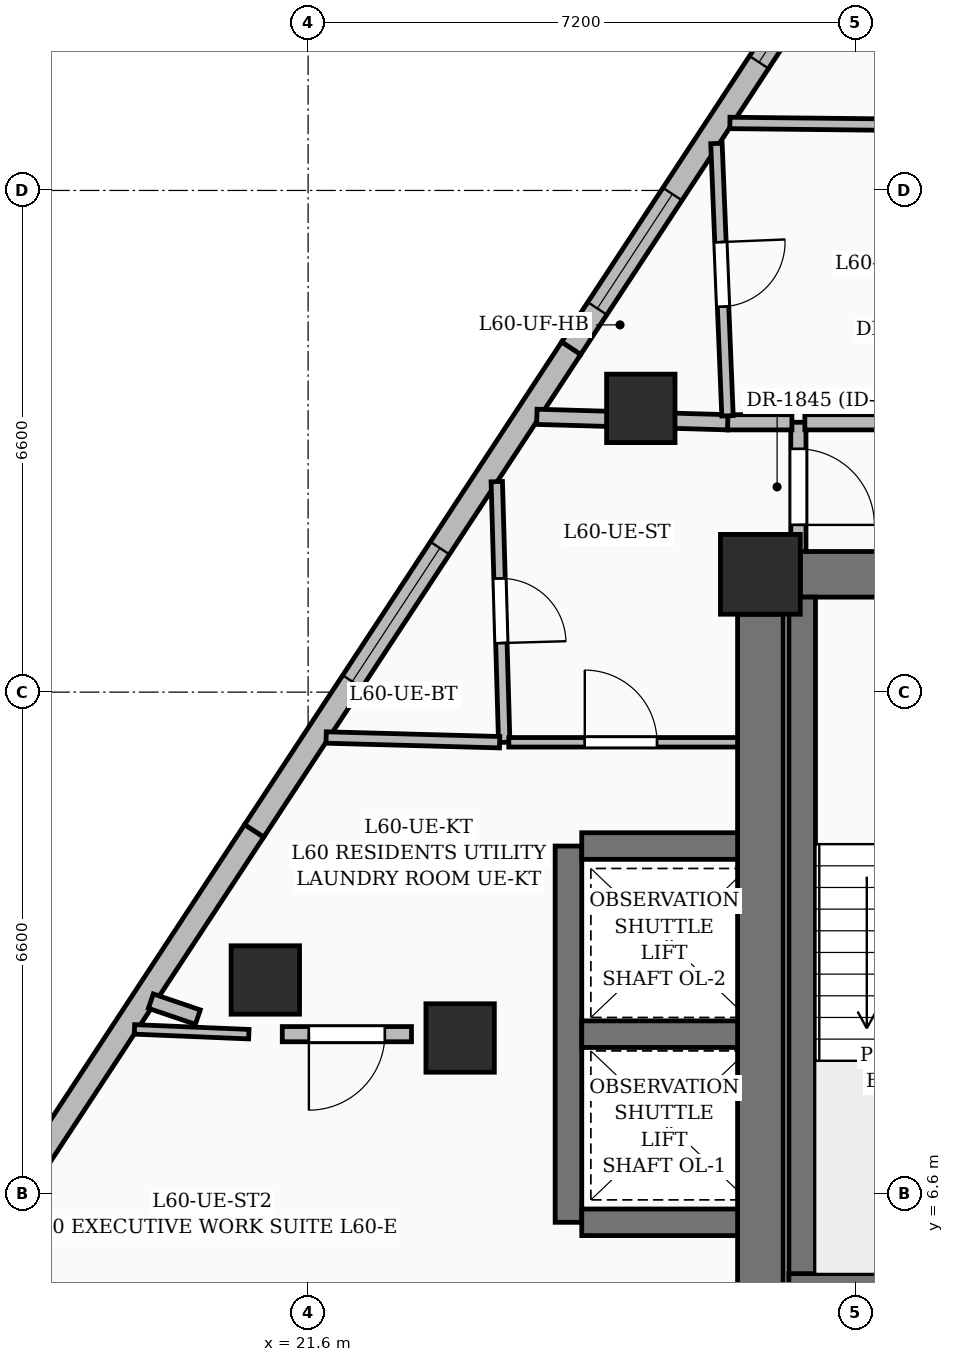
"""IFC4 building model, lengths in metres.
Left out: names, types, materials, properties, quantities, classifications, styles, units other than length and angle.
Written with IfcOpenShell. Run it as: python <this file> out.ifc"""

import sys

from ifc_helpers import new_model, si_unit, direction, frame, frame_2d, origin, origin_2d, place, context, subcontext, project, spatial, rectangle, extrude, element, fill, save


model = new_model("IFC4")
c1 = context("Model", 3, precision=1e-05, world=origin(), true_north=direction((0.0, 1.0)))
c2 = subcontext(c1, "Body", "Model", "MODEL_VIEW")
j1 = project(units=[si_unit("LENGTHUNIT", "METRE"), si_unit("PLANEANGLEUNIT", "RADIAN")], contexts=[c1])
p1 = place(None, origin())
s1 = spatial("IfcSite", under=j1, at=p1, CompositionType="ELEMENT")
p2 = place(p1, origin())
s2 = spatial("IfcBuilding", under=s1, at=p2, CompositionType="ELEMENT")
p3 = place(p2, frame((0.0, 0.0, 233.25)))
s3 = spatial("IfcBuildingStorey", under=s2, at=p3, CompositionType="ELEMENT", Elevation=233.25)
p4 = place(p3, frame((27.55, 14.75, 0.0), z_axis=(0.0, 0.0, 1.0), x_axis=(1.0, 0.0, 0.0)))
e1 = element("IfcColumn", 1, at=p4, inside=s3, PredefinedType="COLUMN", context=c2, shape_type="SweptSolid", body=[
    extrude(rectangle(XDim=1.05, YDim=1.05, at=origin_2d()), origin(), (0.0, 0.0, 1.0), 3.75),
])
p5 = place(p3, frame((23.6, 8.65, 0.0), z_axis=(0.0, 0.0, 1.0), x_axis=(1.0, 0.0, 0.0)))
e2 = element("IfcColumn", 2, at=p5, inside=s3, PredefinedType="COLUMN", context=c2, shape_type="SweptSolid", body=[
    extrude(rectangle(XDim=0.9, YDim=0.9, at=origin_2d()), origin(), (0.0, 0.0, 1.0), 3.75),
])
p6 = place(p3, frame((28.075, 14.75, 0.0), z_axis=(0.0, 0.0, 1.0), x_axis=(1.0, 0.0, 0.0)))
e3 = element("IfcWall", 3, at=p6, inside=s3, PredefinedType="SHEAR", context=c2, shape_type="SweptSolid", body=[
    extrude(rectangle(XDim=6.55, YDim=0.6, at=frame_2d((3.275, 0.0))), origin(), (0.0, 0.0, 1.0), 3.75),
])
p7 = place(p6, frame((1.1, 0.0, 0.0)))
e4 = element("IfcOpeningElement", 4, at=p7, cuts=e3, PredefinedType="OPENING", context=c2, shape_type="SweptSolid", body=[
    extrude(rectangle(XDim=1.05, YDim=2.15, at=frame_2d((0.525, 1.075))), frame((0.0, 0.31, 0.0), z_axis=(0.0, -1.0, 0.0), x_axis=(1.0, 0.0, 0.0)), (0.0, 0.0, 1.0), 0.62),
])
p8 = place(p6, frame((4.95, 0.0, 0.0)))
e5 = element("IfcOpeningElement", 5, at=p8, cuts=e3, PredefinedType="OPENING", context=c2, shape_type="SweptSolid", body=[
    extrude(rectangle(XDim=0.95, YDim=2.15, at=frame_2d((0.475, 1.075))), frame((0.0, 0.31, 0.0), z_axis=(0.0, -1.0, 0.0), x_axis=(1.0, 0.0, 0.0)), (0.0, 0.0, 1.0), 0.62),
])
p9 = place(p3, frame((27.55, 5.075, 0.0), z_axis=(0.0, 0.0, 1.0), x_axis=(0.0, 1.0, 0.0)))
e6 = element("IfcWall", 6, at=p9, inside=s3, PredefinedType="SHEAR", context=c2, shape_type="SweptSolid", body=[
    extrude(rectangle(XDim=9.15, YDim=0.6, at=frame_2d((4.575, 0.0))), origin(), (0.0, 0.0, 1.0), 3.75),
])
p10 = place(p3, frame((28.1, 5.2, 0.0), z_axis=(0.0, 0.0, 1.0), x_axis=(0.0, 1.0, 0.0)))
e7 = element("IfcWall", 7, at=p10, inside=s3, PredefinedType="SOLIDWALL", context=c2, shape_type="SweptSolid", body=[
    extrude(rectangle(XDim=9.25, YDim=0.35, at=frame_2d((4.625, 0.0))), origin(), (0.0, 0.0, 1.0), 3.75),
])
p11 = place(p3, frame((27.925, 5.375, 0.0), z_axis=(0.0, 0.0, 1.0), x_axis=(1.0, 0.0, 0.0)))
e8 = element("IfcWall", 8, at=p11, inside=s3, PredefinedType="SOLIDWALL", context=c2, shape_type="SweptSolid", body=[
    extrude(rectangle(XDim=3.55, YDim=0.35, at=frame_2d((1.775, 0.0))), origin(), (0.0, 0.0, 1.0), 3.75),
])
p12 = place(p3, frame((25.025, 6.225, 0.0), z_axis=(0.0, 0.0, 1.0), x_axis=(0.0, 1.0, 0.0)))
e9 = element("IfcWall", 9, at=p12, inside=s3, PredefinedType="SOLIDWALL", context=c2, shape_type="SweptSolid", body=[
    extrude(rectangle(XDim=4.95, YDim=0.35, at=frame_2d((2.475, 0.0))), origin(), (0.0, 0.0, 1.0), 3.75),
])
for number, where, z_axis, x_axis in (
    (10, (25.2, 6.225, 0.0), (0.0, 0.0, 1.0), (1.0, 0.0, 0.0)),
    (11, (25.2, 8.7, 0.0), (0.0, 0.0, 1.0), (1.0, 0.0, 0.0)),
    (12, (25.2, 11.175, 0.0), (0.0, 0.0, 1.0), (1.0, 0.0, 0.0)),
):
    element("IfcWall", number, at=place(p3, frame(where, z_axis=z_axis, x_axis=x_axis)), inside=s3, PredefinedType="SOLIDWALL", context=c2, shape_type="SweptSolid", body=[
        extrude(rectangle(XDim=2.05, YDim=0.35, at=frame_2d((1.025, 0.0))), origin(), (0.0, 0.0, 1.0), 3.75),
    ])
for number, where, z_axis, x_axis in (
    (13, (25.977, 16.933, 0.0), (0.0, 0.0, 1.0), (1.0, 0.0, 0.0)),
    (14, (21.037, 9.413, 0.0), (0.0, 0.0, 1.0), (1.0, 0.0, 0.0)),
):
    element("IfcColumn", number, at=place(p3, frame(where, z_axis=z_axis, x_axis=x_axis)), inside=s3, PredefinedType="COLUMN", context=c2, shape_type="SweptSolid", body=[
        extrude(rectangle(XDim=0.9, YDim=0.9, at=origin_2d()), origin(), (0.0, 0.0, 1.0), 3.75),
    ])
p13 = place(p3, frame((19.054, 4.36, 0.0), z_axis=(0.0, 0.0, 1.0), x_axis=(-0.726119894398, 0.68756810496, 0.0)))
e15 = element("IfcWall", 15, at=p13, inside=s3, PredefinedType="SOLIDWALL", context=c2, shape_type="SweptSolid", body=[
    extrude(rectangle(XDim=1.995, YDim=0.3, at=frame_2d((0.998, 0.0))), origin(), (0.0, 0.0, 1.0), 3.5),
])
p14 = place(p3, frame((17.057, 5.54, 0.0), z_axis=(0.0, 0.0, 1.0), x_axis=(0.549039031033, 0.83579671117, 0.0)))
e16 = element("IfcWall", 16, at=p14, inside=s3, PredefinedType="SOLIDWALL", context=c2, shape_type="SweptSolid", body=[
    extrude(rectangle(XDim=6.982, YDim=0.3, at=frame_2d((3.491, 0.0))), origin(), (0.0, 0.0, 1.0), 3.5),
])
p15 = place(p3, frame((20.89, 11.376, 0.0), z_axis=(0.0, 0.0, 1.0), x_axis=(0.549043857383, 0.835793540697, 0.0)))
e17 = element("IfcWall", 17, at=p15, inside=s3, PredefinedType="SOLIDWALL", context=c2, shape_type="SweptSolid", body=[
    extrude(rectangle(XDim=7.597, YDim=0.3, at=frame_2d((3.799, 0.0))), origin(), (0.0, 0.0, 1.0), 3.5),
])
p16 = place(p15, frame((2.35, 0.0, 0.55)))
e18 = element("IfcOpeningElement", 18, at=p16, cuts=e17, PredefinedType="OPENING", context=c2, shape_type="SweptSolid", body=[
    extrude(rectangle(XDim=2.1, YDim=2.4, at=frame_2d((1.05, 1.2))), frame((0.0, 0.16, 0.0), z_axis=(0.0, -1.0, 0.0), x_axis=(1.0, 0.0, 0.0)), (0.0, 0.0, 1.0), 0.32),
])
p17 = place(p3, frame((25.062, 17.725, 0.0), z_axis=(0.0, 0.0, 1.0), x_axis=(0.549051383212, 0.835788596831, 0.0)))
e19 = element("IfcWall", 19, at=p17, inside=s3, PredefinedType="SOLIDWALL", context=c2, shape_type="SweptSolid", body=[
    extrude(rectangle(XDim=7.317, YDim=0.3, at=frame_2d((3.659, 0.0))), origin(), (0.0, 0.0, 1.0), 3.5),
])
p18 = place(p17, frame((0.625, 0.0, 0.6)))
e20 = element("IfcOpeningElement", 20, at=p18, cuts=e19, PredefinedType="OPENING", context=c2, shape_type="SweptSolid", body=[
    extrude(rectangle(XDim=1.8, YDim=2.1, at=frame_2d((0.9, 1.05))), frame((0.0, 0.16, 0.0), z_axis=(0.0, -1.0, 0.0), x_axis=(1.0, 0.0, 0.0)), (0.0, 0.0, 1.0), 0.32),
])
p19 = place(p17, frame((4.5, 0.0, 0.6)))
e21 = element("IfcOpeningElement", 21, at=p19, cuts=e19, PredefinedType="OPENING", context=c2, shape_type="SweptSolid", body=[
    extrude(rectangle(XDim=1.8, YDim=2.1, at=frame_2d((0.9, 1.05))), frame((0.0, 0.16, 0.0), z_axis=(0.0, -1.0, 0.0), x_axis=(1.0, 0.0, 0.0)), (0.0, 0.0, 1.0), 0.32),
])
p20 = place(p3, frame((28.05, 16.75, 0.0), z_axis=(0.0, 0.0, 1.0), x_axis=(0.0, -1.0, 0.0)))
e22 = element("IfcWall", 22, at=p20, inside=s3, PredefinedType="PARTITIONING", context=c2, shape_type="SweptSolid", body=[
    extrude(rectangle(XDim=1.7, YDim=0.2, at=frame_2d((0.85, 0.0))), origin(), (0.0, 0.0, 1.0), 3.5),
])
p21 = place(p20, frame((0.35, 0.0, 0.0)))
e23 = element("IfcOpeningElement", 23, at=p21, cuts=e22, PredefinedType="OPENING", context=c2, shape_type="SweptSolid", body=[
    extrude(rectangle(XDim=1.0, YDim=2.2, at=frame_2d((0.5, 1.1))), frame((0.0, 0.11, 0.0), z_axis=(0.0, -1.0, 0.0), x_axis=(1.0, 0.0, 0.0)), (0.0, 0.0, 1.0), 0.22),
])
p22 = place(p3, frame((33.66, 16.75, 0.0), z_axis=(0.0, 0.0, 1.0), x_axis=(-1.0, 0.0, 0.0)))
e24 = element("IfcWall", 24, at=p22, inside=s3, PredefinedType="PARTITIONING", context=c2, shape_type="SweptSolid", body=[
    extrude(rectangle(XDim=5.525, YDim=0.2, at=frame_2d((2.762, 0.0))), origin(), (0.0, 0.0, 1.0), 3.5),
])
p23 = place(p22, frame((2.364, 0.0, 0.0)))
e25 = element("IfcOpeningElement", 25, at=p23, cuts=e24, PredefinedType="OPENING", context=c2, shape_type="SweptSolid", body=[
    extrude(rectangle(XDim=1.0, YDim=2.2, at=frame_2d((0.5, 1.1))), frame((0.0, 0.11, 0.0), z_axis=(0.0, -1.0, 0.0), x_axis=(1.0, 0.0, 0.0)), (0.0, 0.0, 1.0), 0.22),
])
p24 = place(p3, frame((20.149, 8.925, 0.0), z_axis=(0.0, 0.0, 1.0), x_axis=(-0.946606200233, 0.322392155117, 0.0)))
e26 = element("IfcWall", 26, at=p24, inside=s3, PredefinedType="PARTITIONING", context=c2, shape_type="SweptSolid", body=[
    extrude(rectangle(XDim=0.653, YDim=0.2, at=frame_2d((0.326, 0.0))), origin(), (0.0, 0.0, 1.0), 3.5),
])
p25 = place(p3, frame((22.96, 8.7, 0.0), z_axis=(0.0, 0.0, 1.0), x_axis=(-1.0, 0.0, 0.0)))
e27 = element("IfcWall", 27, at=p25, inside=s3, PredefinedType="PARTITIONING", context=c2, shape_type="SweptSolid", body=[
    extrude(rectangle(XDim=1.7, YDim=0.2, at=frame_2d((0.85, 0.0))), origin(), (0.0, 0.0, 1.0), 2.685),
])
p26 = place(p25, frame((0.35, 0.0, 0.0)))
e28 = element("IfcOpeningElement", 28, at=p26, cuts=e27, PredefinedType="OPENING", context=c2, shape_type="SweptSolid", body=[
    extrude(rectangle(XDim=1.0, YDim=2.2, at=frame_2d((0.5, 1.1))), frame((0.0, 0.11, 0.0), z_axis=(0.0, -1.0, 0.0), x_axis=(1.0, 0.0, 0.0)), (0.0, 0.0, 1.0), 0.22),
])
p27 = place(p3, frame((24.082, 15.969, 0.0), z_axis=(0.0, 0.0, 1.0), x_axis=(0.02853945599, -0.999592666766, 0.0)))
e29 = element("IfcWall", 29, at=p27, inside=s3, PredefinedType="PARTITIONING", context=c2, shape_type="SweptSolid", body=[
    extrude(rectangle(XDim=3.43, YDim=0.15, at=frame_2d((1.715, 0.0))), origin(), (0.0, 0.0, 1.0), 2.82),
])
p28 = place(p27, frame((1.274, 0.0, 0.0)))
e30 = element("IfcOpeningElement", 30, at=p28, cuts=e29, PredefinedType="OPENING", context=c2, shape_type="SweptSolid", body=[
    extrude(rectangle(XDim=0.85, YDim=2.1, at=frame_2d((0.425, 1.05))), frame((0.0, 0.085, 0.0), z_axis=(0.0, -1.0, 0.0), x_axis=(1.0, 0.0, 0.0)), (0.0, 0.0, 1.0), 0.17),
])
p29 = place(p3, frame((24.24, 12.54, 0.0), z_axis=(0.0, 0.0, 1.0), x_axis=(1.0, 0.0, 0.0)))
e31 = element("IfcWall", 31, at=p29, inside=s3, PredefinedType="PARTITIONING", context=c2, shape_type="SweptSolid", body=[
    extrude(rectangle(XDim=3.01, YDim=0.125, at=frame_2d((1.505, 0.0))), origin(), (0.0, 0.0, 1.0), 3.5),
])
p30 = place(p29, frame((1.0, 0.0, 0.0)))
e32 = element("IfcOpeningElement", 32, at=p30, cuts=e31, PredefinedType="OPENING", context=c2, shape_type="SweptSolid", body=[
    extrude(rectangle(XDim=0.95, YDim=2.2, at=frame_2d((0.475, 1.1))), frame((0.0, 0.072, 0.0), z_axis=(0.0, -1.0, 0.0), x_axis=(1.0, 0.0, 0.0)), (0.0, 0.0, 1.0), 0.145),
])
p31 = place(p3, frame((27.965, 16.75, 0.0), z_axis=(0.0, 0.0, 1.0), x_axis=(-1.0, 0.0, 0.0)))
e33 = element("IfcWall", 33, at=p31, inside=s3, PredefinedType="PARTITIONING", context=c2, shape_type="SweptSolid", body=[
    extrude(rectangle(XDim=0.845, YDim=0.2, at=frame_2d((0.422, 0.0))), origin(), (0.0, 0.0, 1.0), 3.061),
])
p32 = place(p3, frame((27.12, 16.75, 0.0), z_axis=(0.0, 0.0, 1.0), x_axis=(-0.999588989249, 0.028667971206, 0.0)))
e34 = element("IfcWall", 34, at=p32, inside=s3, PredefinedType="PARTITIONING", context=c2, shape_type="SweptSolid", body=[
    extrude(rectangle(XDim=2.512, YDim=0.2, at=frame_2d((1.256, 0.0))), origin(), (0.0, 0.0, 1.0), 3.5),
])
p33 = place(p3, frame((21.837, 12.603, 0.0), z_axis=(0.0, 0.0, 1.0), x_axis=(0.999634267339, -0.027043142604, 0.0)))
e35 = element("IfcWall", 35, at=p33, inside=s3, PredefinedType="PARTITIONING", context=c2, shape_type="SweptSolid", body=[
    extrude(rectangle(XDim=2.284, YDim=0.15, at=frame_2d((1.142, 0.0))), origin(), (0.0, 0.0, 1.0), 2.82),
])
p34 = place(p3, frame((26.972, 20.418, 0.0), z_axis=(0.0, 0.0, 1.0), x_axis=(0.040645044175, -0.999173648764, 0.0)))
e36 = element("IfcWall", 36, at=p34, inside=s3, PredefinedType="PARTITIONING", context=c2, shape_type="SweptSolid", body=[
    extrude(rectangle(XDim=3.586, YDim=0.15, at=frame_2d((1.793, 0.0))), origin(), (0.0, 0.0, 1.0), 2.82),
])
p35 = place(p34, frame((1.298, 0.0, 0.0)))
e37 = element("IfcOpeningElement", 37, at=p35, cuts=e36, PredefinedType="OPENING", context=c2, shape_type="SweptSolid", body=[
    extrude(rectangle(XDim=0.85, YDim=2.1, at=frame_2d((0.425, 1.05))), frame((0.0, 0.085, 0.0), z_axis=(0.0, -1.0, 0.0), x_axis=(1.0, 0.0, 0.0)), (0.0, 0.0, 1.0), 0.17),
])
p36 = place(p3, frame((33.613, 20.62, 0.0), z_axis=(0.0, 0.0, 1.0), x_axis=(-0.999945270441, 0.010462128042, 0.0)))
e38 = element("IfcWall", 38, at=p36, inside=s3, PredefinedType="PARTITIONING", context=c2, shape_type="SweptSolid", body=[
    extrude(rectangle(XDim=6.464, YDim=0.15, at=frame_2d((3.232, 0.0))), origin(), (0.0, 0.0, 1.0), 2.685),
])
p37 = place(p36, frame((2.835, 0.0, 0.0)))
e39 = element("IfcOpeningElement", 39, at=p37, cuts=e38, PredefinedType="OPENING", context=c2, shape_type="SweptSolid", body=[
    extrude(rectangle(XDim=0.9, YDim=2.15, at=frame_2d((0.45, 1.075))), frame((0.0, 0.085, 0.0), z_axis=(0.0, -1.0, 0.0), x_axis=(1.0, 0.0, 0.0)), (0.0, 0.0, 1.0), 0.17),
])
p38 = place(p3, frame((20.82, 8.7, 0.0), z_axis=(0.0, 0.0, 1.0), x_axis=(-0.999125472924, 0.041812550205, 0.0)))
e40 = element("IfcWall", 40, at=p38, inside=s3, PredefinedType="PARTITIONING", context=c2, shape_type="SweptSolid", body=[
    extrude(rectangle(XDim=1.506, YDim=0.125, at=frame_2d((0.753, 0.0))), origin(), (0.0, 0.0, 1.0), 3.5),
])
p39 = place(p16, origin())
e41 = element("IfcWindow", 41, at=p39, inside=s3, PartitioningType="SINGLE_PANEL", PredefinedType="WINDOW", context=c2, shape_type="SweptSolid", body=[
    extrude(rectangle(XDim=2.1, YDim=2.4, at=frame_2d((1.05, 1.2))), frame((0.0, 0.03, 0.0), z_axis=(0.0, -1.0, 0.0), x_axis=(1.0, 0.0, 0.0)), (0.0, 0.0, 1.0), 0.06),
])
fill(e18, e41)
p40 = place(p18, origin())
e42 = element("IfcWindow", 42, at=p40, inside=s3, PartitioningType="SINGLE_PANEL", PredefinedType="WINDOW", context=c2, shape_type="SweptSolid", body=[
    extrude(rectangle(XDim=1.8, YDim=2.1, at=frame_2d((0.9, 1.05))), frame((0.0, 0.03, 0.0), z_axis=(0.0, -1.0, 0.0), x_axis=(1.0, 0.0, 0.0)), (0.0, 0.0, 1.0), 0.06),
])
fill(e20, e42)
p41 = place(p19, origin())
e43 = element("IfcWindow", 43, at=p41, inside=s3, PartitioningType="SINGLE_PANEL", PredefinedType="WINDOW", context=c2, shape_type="SweptSolid", body=[
    extrude(rectangle(XDim=1.8, YDim=2.1, at=frame_2d((0.9, 1.05))), frame((0.0, 0.03, 0.0), z_axis=(0.0, -1.0, 0.0), x_axis=(1.0, 0.0, 0.0)), (0.0, 0.0, 1.0), 0.06),
])
fill(e21, e43)
p42 = place(p21, origin())
e44 = element("IfcDoor", 44, at=p42, inside=s3, OperationType="SINGLE_SWING_RIGHT", PredefinedType="DOOR", context=c2, shape_type="SweptSolid", body=[
    extrude(rectangle(XDim=1.0, YDim=2.2, at=frame_2d((0.5, 1.1))), frame((0.0, 0.025, 0.0), z_axis=(0.0, -1.0, 0.0), x_axis=(1.0, 0.0, 0.0)), (0.0, 0.0, 1.0), 0.05),
])
fill(e23, e44)
p43 = place(p30, origin())
e45 = element("IfcDoor", 45, at=p43, inside=s3, OperationType="SINGLE_SWING_LEFT", PredefinedType="DOOR", context=c2, shape_type="SweptSolid", body=[
    extrude(rectangle(XDim=0.95, YDim=2.2, at=frame_2d((0.475, 1.1))), frame((0.0, 0.025, 0.0), z_axis=(0.0, -1.0, 0.0), x_axis=(1.0, 0.0, 0.0)), (0.0, 0.0, 1.0), 0.05),
])
fill(e32, e45)
p44 = place(p28, origin())
e46 = element("IfcDoor", 46, at=p44, inside=s3, OperationType="SINGLE_SWING_RIGHT", PredefinedType="DOOR", context=c2, shape_type="SweptSolid", body=[
    extrude(rectangle(XDim=0.85, YDim=2.1, at=frame_2d((0.425, 1.05))), frame((0.0, 0.025, 0.0), z_axis=(0.0, -1.0, 0.0), x_axis=(1.0, 0.0, 0.0)), (0.0, 0.0, 1.0), 0.05),
])
fill(e30, e46)
p45 = place(p35, origin())
e47 = element("IfcDoor", 47, at=p45, inside=s3, OperationType="SINGLE_SWING_LEFT", PredefinedType="DOOR", context=c2, shape_type="SweptSolid", body=[
    extrude(rectangle(XDim=0.85, YDim=2.1, at=frame_2d((0.425, 1.05))), frame((0.0, 0.025, 0.0), z_axis=(0.0, -1.0, 0.0), x_axis=(1.0, 0.0, 0.0)), (0.0, 0.0, 1.0), 0.05),
])
fill(e37, e47)
p46 = place(p26, origin())
e48 = element("IfcDoor", 48, at=p46, inside=s3, OperationType="SINGLE_SWING_RIGHT", PredefinedType="DOOR", context=c2, shape_type="SweptSolid", body=[
    extrude(rectangle(XDim=1.0, YDim=2.2, at=frame_2d((0.5, 1.1))), frame((0.0, 0.025, 0.0), z_axis=(0.0, -1.0, 0.0), x_axis=(1.0, 0.0, 0.0)), (0.0, 0.0, 1.0), 0.05),
])
fill(e28, e48)
save(model, sys.argv[1])
